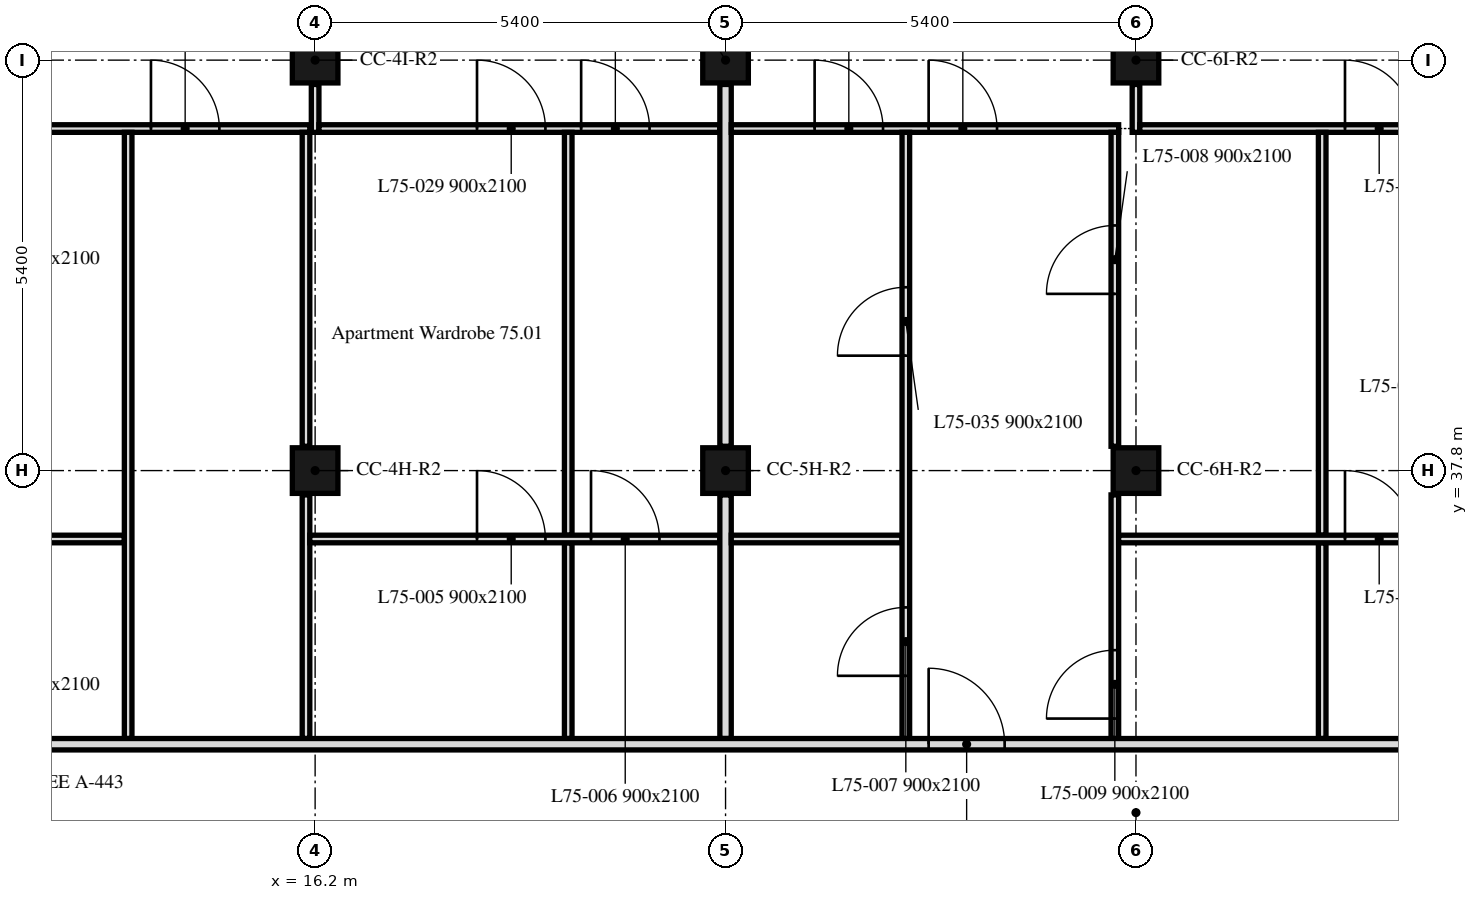
"""IFC4 building model, lengths in metres.
Left out: names, types, materials, properties, quantities, classifications, styles, units other than length and angle.
Written with IfcOpenShell. Run it as: python <this file> out.ifc"""

import sys

from ifc_helpers import new_model, si_unit, direction, frame, frame_2d, origin, origin_2d, place, context, subcontext, project, spatial, rectangle, extrude, element, fill, save


model = new_model("IFC4")
c1 = context("Model", 3, precision=1e-05, world=origin(), true_north=direction((0.0, 1.0)))
c2 = subcontext(c1, "Body", "Model", "MODEL_VIEW")
j1 = project(units=[si_unit("LENGTHUNIT", "METRE"), si_unit("PLANEANGLEUNIT", "RADIAN")], contexts=[c1])
p1 = place(None, origin())
s1 = spatial("IfcSite", under=j1, at=p1, CompositionType="ELEMENT")
p2 = place(p1, origin())
s2 = spatial("IfcBuilding", under=s1, at=p2, CompositionType="ELEMENT")
p3 = place(p2, frame((0.0, 0.0, 301.6)))
s3 = spatial("IfcBuildingStorey", under=s2, at=p3, CompositionType="ELEMENT", Elevation=301.6)
for number, where, z_axis, x_axis in (
    (1, (16.2, 37.8, 0.0), (0.0, 0.0, 1.0), (1.0, 0.0, 0.0)),
    (2, (21.6, 37.8, 0.0), (0.0, 0.0, 1.0), (1.0, 0.0, 0.0)),
    (3, (27.0, 37.8, 0.0), (0.0, 0.0, 1.0), (1.0, 0.0, 0.0)),
    (4, (16.2, 43.2, 0.0), (0.0, 0.0, 1.0), (1.0, 0.0, 0.0)),
    (5, (21.6, 43.2, 0.0), (0.0, 0.0, 1.0), (1.0, 0.0, 0.0)),
    (6, (27.0, 43.2, 0.0), (0.0, 0.0, 1.0), (1.0, 0.0, 0.0)),
):
    element("IfcColumn", number, at=place(p3, frame(where, z_axis=z_axis, x_axis=x_axis)), inside=s3, PredefinedType="COLUMN", context=c2, shape_type="SweptSolid", body=[
        extrude(rectangle(XDim=0.6, YDim=0.6, at=origin_2d()), origin(), (0.0, 0.0, 1.0), 3.0),
    ])
p4 = place(p3, frame((6.151, 42.3, 0.0), z_axis=(0.0, 0.0, 1.0), x_axis=(1.0, 0.0, 0.0)))
e7 = element("IfcWall", 7, at=p4, inside=s3, PredefinedType="PARTITIONING", context=c2, shape_type="SweptSolid", body=[
    extrude(rectangle(XDim=9.979, YDim=0.1, at=frame_2d((4.99, 0.0))), origin(), (0.0, 0.0, 1.0), 3.0),
])
p5 = place(p4, frame((7.889, 0.0, 0.0)))
e8 = element("IfcOpeningElement", 8, at=p5, cuts=e7, PredefinedType="OPENING", context=c2, shape_type="SweptSolid", body=[
    extrude(rectangle(XDim=0.9, YDim=2.1, at=frame_2d((0.45, 1.05))), frame((0.0, 0.05, 0.0), z_axis=(0.0, -1.0, 0.0), x_axis=(1.0, 0.0, 0.0)), (0.0, 0.0, 1.0), 0.1),
])
p6 = place(p4, frame((1.019, 0.0, 0.0)))
e9 = element("IfcOpeningElement", 9, at=p6, cuts=e7, PredefinedType="OPENING", context=c2, shape_type="SweptSolid", body=[
    extrude(rectangle(XDim=0.9, YDim=2.1, at=frame_2d((0.45, 1.05))), frame((0.0, 0.05, 0.0), z_axis=(0.0, -1.0, 0.0), x_axis=(1.0, 0.0, 0.0)), (0.0, 0.0, 1.0), 0.1),
])
p7 = place(p4, frame((2.389, 0.0, 0.0)))
e10 = element("IfcOpeningElement", 10, at=p7, cuts=e7, PredefinedType="OPENING", context=c2, shape_type="SweptSolid", body=[
    extrude(rectangle(XDim=0.9, YDim=2.1, at=frame_2d((0.45, 1.05))), frame((0.0, 0.05, 0.0), z_axis=(0.0, -1.0, 0.0), x_axis=(1.0, 0.0, 0.0)), (0.0, 0.0, 1.0), 0.1),
])
p8 = place(p3, frame((16.2, 42.25, 0.0), z_axis=(0.0, 0.0, 1.0), x_axis=(0.0, 1.0, 0.0)))
e11 = element("IfcWall", 11, at=p8, inside=s3, PredefinedType="PARTITIONING", context=c2, shape_type="SweptSolid", body=[
    extrude(rectangle(XDim=0.63, YDim=0.1, at=frame_2d((0.315, 0.0))), origin(), (0.0, 0.0, 1.0), 2.4),
])
p9 = place(p3, frame((16.25, 42.3, 0.0), z_axis=(0.0, 0.0, 1.0), x_axis=(1.0, 0.0, 0.0)))
e12 = element("IfcWall", 12, at=p9, inside=s3, PredefinedType="PARTITIONING", context=c2, shape_type="SweptSolid", body=[
    extrude(rectangle(XDim=5.275, YDim=0.1, at=frame_2d((2.637, 0.0))), origin(), (0.0, 0.0, 1.0), 3.0),
])
p10 = place(p9, frame((2.08, 0.0, 0.0)))
e13 = element("IfcOpeningElement", 13, at=p10, cuts=e12, PredefinedType="OPENING", context=c2, shape_type="SweptSolid", body=[
    extrude(rectangle(XDim=0.9, YDim=2.1, at=frame_2d((0.45, 1.05))), frame((0.0, 0.05, 0.0), z_axis=(0.0, -1.0, 0.0), x_axis=(1.0, 0.0, 0.0)), (0.0, 0.0, 1.0), 0.1),
])
p11 = place(p9, frame((3.45, 0.0, 0.0)))
e14 = element("IfcOpeningElement", 14, at=p11, cuts=e12, PredefinedType="OPENING", context=c2, shape_type="SweptSolid", body=[
    extrude(rectangle(XDim=0.9, YDim=2.1, at=frame_2d((0.45, 1.05))), frame((0.0, 0.05, 0.0), z_axis=(0.0, -1.0, 0.0), x_axis=(1.0, 0.0, 0.0)), (0.0, 0.0, 1.0), 0.1),
])
p12 = place(p3, frame((10.99, 36.9, 0.0), z_axis=(0.0, 0.0, 1.0), x_axis=(1.0, 0.0, 0.0)))
e15 = element("IfcWall", 15, at=p12, inside=s3, PredefinedType="PARTITIONING", context=c2, shape_type="SweptSolid", body=[
    extrude(rectangle(XDim=2.7, YDim=0.1, at=frame_2d((1.35, 0.0))), origin(), (0.0, 0.0, 1.0), 3.0),
])
p13 = place(p3, frame((13.74, 34.275, 0.0), z_axis=(0.0, 0.0, 1.0), x_axis=(0.0, 1.0, 0.0)))
e16 = element("IfcWall", 16, at=p13, inside=s3, PredefinedType="PARTITIONING", context=c2, shape_type="SweptSolid", body=[
    extrude(rectangle(XDim=7.975, YDim=0.1, at=frame_2d((3.988, 0.0))), origin(), (0.0, 0.0, 1.0), 3.0),
])
p14 = place(p3, frame((16.08, 34.275, 0.0), z_axis=(0.0, 0.0, 1.0), x_axis=(0.0, 1.0, 0.0)))
e17 = element("IfcWall", 17, at=p14, inside=s3, PredefinedType="PARTITIONING", context=c2, shape_type="SweptSolid", body=[
    extrude(rectangle(XDim=3.205, YDim=0.1, at=frame_2d((1.603, 0.0))), origin(), (0.0, 0.0, 1.0), 2.4),
])
p15 = place(p3, frame((16.08, 38.12, 0.0), z_axis=(0.0, 0.0, 1.0), x_axis=(0.0, 1.0, 0.0)))
e18 = element("IfcWall", 18, at=p15, inside=s3, PredefinedType="PARTITIONING", context=c2, shape_type="SweptSolid", body=[
    extrude(rectangle(XDim=4.13, YDim=0.1, at=frame_2d((2.065, 0.0))), origin(), (0.0, 0.0, 1.0), 2.4),
])
p16 = place(p3, frame((19.53, 36.95, 0.0), z_axis=(0.0, 0.0, 1.0), x_axis=(0.0, 1.0, 0.0)))
e19 = element("IfcWall", 19, at=p16, inside=s3, PredefinedType="PARTITIONING", context=c2, shape_type="SweptSolid", body=[
    extrude(rectangle(XDim=5.3, YDim=0.1, at=frame_2d((2.65, 0.0))), origin(), (0.0, 0.0, 1.0), 3.0),
])
p17 = place(p3, frame((19.53, 34.275, 0.0), z_axis=(0.0, 0.0, 1.0), x_axis=(0.0, 1.0, 0.0)))
e20 = element("IfcWall", 20, at=p17, inside=s3, PredefinedType="PARTITIONING", context=c2, shape_type="SweptSolid", body=[
    extrude(rectangle(XDim=2.575, YDim=0.1, at=frame_2d((1.288, 0.0))), origin(), (0.0, 0.0, 1.0), 3.0),
])
p18 = place(p3, frame((16.13, 36.9, 0.0), z_axis=(0.0, 0.0, 1.0), x_axis=(1.0, 0.0, 0.0)))
e21 = element("IfcWall", 21, at=p18, inside=s3, PredefinedType="PARTITIONING", context=c2, shape_type="SweptSolid", body=[
    extrude(rectangle(XDim=5.395, YDim=0.1, at=frame_2d((2.698, 0.0))), origin(), (0.0, 0.0, 1.0), 3.0),
])
p19 = place(p18, frame((2.2, 0.0, 0.0)))
e22 = element("IfcOpeningElement", 22, at=p19, cuts=e21, PredefinedType="OPENING", context=c2, shape_type="SweptSolid", body=[
    extrude(rectangle(XDim=0.9, YDim=2.1, at=frame_2d((0.45, 1.05))), frame((0.0, 0.05, 0.0), z_axis=(0.0, -1.0, 0.0), x_axis=(1.0, 0.0, 0.0)), (0.0, 0.0, 1.0), 0.1),
])
p20 = place(p18, frame((3.7, 0.0, 0.0)))
e23 = element("IfcOpeningElement", 23, at=p20, cuts=e21, PredefinedType="OPENING", context=c2, shape_type="SweptSolid", body=[
    extrude(rectangle(XDim=0.9, YDim=2.1, at=frame_2d((0.45, 1.05))), frame((0.0, 0.05, 0.0), z_axis=(0.0, -1.0, 0.0), x_axis=(1.0, 0.0, 0.0)), (0.0, 0.0, 1.0), 0.1),
])
p21 = place(p3, frame((21.6, 38.12, 0.0), z_axis=(0.0, 0.0, 1.0), x_axis=(0.0, 1.0, 0.0)))
e24 = element("IfcWall", 24, at=p21, inside=s3, PredefinedType="PARTITIONING", context=c2, shape_type="SweptSolid", body=[
    extrude(rectangle(XDim=4.76, YDim=0.15, at=frame_2d((2.38, 0.0))), origin(), (0.0, 0.0, 1.0), 2.4),
])
p22 = place(p3, frame((21.6, 34.275, 0.0), z_axis=(0.0, 0.0, 1.0), x_axis=(0.0, 1.0, 0.0)))
e25 = element("IfcWall", 25, at=p22, inside=s3, PredefinedType="PARTITIONING", context=c2, shape_type="SweptSolid", body=[
    extrude(rectangle(XDim=3.205, YDim=0.15, at=frame_2d((1.603, 0.0))), origin(), (0.0, 0.0, 1.0), 2.4),
])
p23 = place(p3, frame((21.675, 42.3, 0.0), z_axis=(0.0, 0.0, 1.0), x_axis=(1.0, 0.0, 0.0)))
e26 = element("IfcWall", 26, at=p23, inside=s3, PredefinedType="PARTITIONING", context=c2, shape_type="SweptSolid", body=[
    extrude(rectangle(XDim=5.097, YDim=0.1, at=frame_2d((2.548, 0.0))), origin(), (0.0, 0.0, 1.0), 3.0),
])
p24 = place(p23, frame((1.097, 0.0, 0.0)))
e27 = element("IfcOpeningElement", 27, at=p24, cuts=e26, PredefinedType="OPENING", context=c2, shape_type="SweptSolid", body=[
    extrude(rectangle(XDim=0.9, YDim=2.1, at=frame_2d((0.45, 1.05))), frame((0.0, 0.05, 0.0), z_axis=(0.0, -1.0, 0.0), x_axis=(1.0, 0.0, 0.0)), (0.0, 0.0, 1.0), 0.1),
])
p25 = place(p23, frame((2.597, 0.0, 0.0)))
e28 = element("IfcOpeningElement", 28, at=p25, cuts=e26, PredefinedType="OPENING", context=c2, shape_type="SweptSolid", body=[
    extrude(rectangle(XDim=0.9, YDim=2.1, at=frame_2d((0.45, 1.05))), frame((0.0, 0.05, 0.0), z_axis=(0.0, -1.0, 0.0), x_axis=(1.0, 0.0, 0.0)), (0.0, 0.0, 1.0), 0.1),
])
p26 = place(p3, frame((27.0, 42.25, 0.0), z_axis=(0.0, 0.0, 1.0), x_axis=(0.0, 1.0, 0.0)))
e29 = element("IfcWall", 29, at=p26, inside=s3, PredefinedType="PARTITIONING", context=c2, shape_type="SweptSolid", body=[
    extrude(rectangle(XDim=0.63, YDim=0.1, at=frame_2d((0.315, 0.0))), origin(), (0.0, 0.0, 1.0), 2.4),
])
p27 = place(p3, frame((27.05, 42.3, 0.0), z_axis=(0.0, 0.0, 1.0), x_axis=(1.0, 0.0, 0.0)))
e30 = element("IfcWall", 30, at=p27, inside=s3, PredefinedType="PARTITIONING", context=c2, shape_type="SweptSolid", body=[
    extrude(rectangle(XDim=5.275, YDim=0.1, at=frame_2d((2.637, 0.0))), origin(), (0.0, 0.0, 1.0), 3.0),
])
p28 = place(p27, frame((2.7, 0.0, 0.0)))
e31 = element("IfcOpeningElement", 31, at=p28, cuts=e30, PredefinedType="OPENING", context=c2, shape_type="SweptSolid", body=[
    extrude(rectangle(XDim=0.9, YDim=2.1, at=frame_2d((0.45, 1.05))), frame((0.0, 0.05, 0.0), z_axis=(0.0, -1.0, 0.0), x_axis=(1.0, 0.0, 0.0)), (0.0, 0.0, 1.0), 0.1),
])
p29 = place(p3, frame((21.675, 36.9, 0.0), z_axis=(0.0, 0.0, 1.0), x_axis=(1.0, 0.0, 0.0)))
e32 = element("IfcWall", 32, at=p29, inside=s3, PredefinedType="PARTITIONING", context=c2, shape_type="SweptSolid", body=[
    extrude(rectangle(XDim=2.247, YDim=0.1, at=frame_2d((1.124, 0.0))), origin(), (0.0, 0.0, 1.0), 3.0),
])
p30 = place(p3, frame((23.972, 34.275, 0.0), z_axis=(0.0, 0.0, 1.0), x_axis=(0.0, 1.0, 0.0)))
e33 = element("IfcWall", 33, at=p30, inside=s3, PredefinedType="PARTITIONING", context=c2, shape_type="SweptSolid", body=[
    extrude(rectangle(XDim=7.975, YDim=0.1, at=frame_2d((3.988, 0.0))), origin(), (0.0, 0.0, 1.0), 3.0),
])
p31 = place(p30, frame((0.825, 0.0, 0.0)))
e34 = element("IfcOpeningElement", 34, at=p31, cuts=e33, PredefinedType="OPENING", context=c2, shape_type="SweptSolid", body=[
    extrude(rectangle(XDim=0.9, YDim=2.1, at=frame_2d((0.45, 1.05))), frame((0.0, 0.05, 0.0), z_axis=(0.0, -1.0, 0.0), x_axis=(1.0, 0.0, 0.0)), (0.0, 0.0, 1.0), 0.1),
])
p32 = place(p30, frame((5.037, 0.0, 0.0)))
e35 = element("IfcOpeningElement", 35, at=p32, cuts=e33, PredefinedType="OPENING", context=c2, shape_type="SweptSolid", body=[
    extrude(rectangle(XDim=0.9, YDim=2.1, at=frame_2d((0.45, 1.05))), frame((0.0, 0.05, 0.0), z_axis=(0.0, -1.0, 0.0), x_axis=(1.0, 0.0, 0.0)), (0.0, 0.0, 1.0), 0.1),
])
p33 = place(p3, frame((26.722, 34.275, 0.0), z_axis=(0.0, 0.0, 1.0), x_axis=(0.0, 1.0, 0.0)))
e36 = element("IfcWall", 36, at=p33, inside=s3, PredefinedType="PARTITIONING", context=c2, shape_type="SweptSolid", body=[
    extrude(rectangle(XDim=3.205, YDim=0.1, at=frame_2d((1.603, 0.0))), origin(), (0.0, 0.0, 1.0), 3.0),
])
p34 = place(p33, frame((0.262, 0.0, 0.0)))
e37 = element("IfcOpeningElement", 37, at=p34, cuts=e36, PredefinedType="OPENING", context=c2, shape_type="SweptSolid", body=[
    extrude(rectangle(XDim=0.9, YDim=2.1, at=frame_2d((0.45, 1.05))), frame((0.0, 0.05, 0.0), z_axis=(0.0, -1.0, 0.0), x_axis=(1.0, 0.0, 0.0)), (0.0, 0.0, 1.0), 0.1),
])
p35 = place(p3, frame((26.722, 38.12, 0.0), z_axis=(0.0, 0.0, 1.0), x_axis=(0.0, 1.0, 0.0)))
e38 = element("IfcWall", 38, at=p35, inside=s3, PredefinedType="PARTITIONING", context=c2, shape_type="SweptSolid", body=[
    extrude(rectangle(XDim=4.13, YDim=0.1, at=frame_2d((2.065, 0.0))), origin(), (0.0, 0.0, 1.0), 3.0),
])
p36 = place(p35, frame((2.005, 0.0, 0.0)))
e39 = element("IfcOpeningElement", 39, at=p36, cuts=e38, PredefinedType="OPENING", context=c2, shape_type="SweptSolid", body=[
    extrude(rectangle(XDim=0.9, YDim=2.1, at=frame_2d((0.45, 1.05))), frame((0.0, 0.05, 0.0), z_axis=(0.0, -1.0, 0.0), x_axis=(1.0, 0.0, 0.0)), (0.0, 0.0, 1.0), 0.1),
])
p37 = place(p3, frame((29.45, 36.95, 0.0), z_axis=(0.0, 0.0, 1.0), x_axis=(0.0, 1.0, 0.0)))
e40 = element("IfcWall", 40, at=p37, inside=s3, PredefinedType="PARTITIONING", context=c2, shape_type="SweptSolid", body=[
    extrude(rectangle(XDim=5.3, YDim=0.1, at=frame_2d((2.65, 0.0))), origin(), (0.0, 0.0, 1.0), 3.0),
])
p38 = place(p3, frame((29.45, 34.275, 0.0), z_axis=(0.0, 0.0, 1.0), x_axis=(0.0, 1.0, 0.0)))
e41 = element("IfcWall", 41, at=p38, inside=s3, PredefinedType="PARTITIONING", context=c2, shape_type="SweptSolid", body=[
    extrude(rectangle(XDim=2.575, YDim=0.1, at=frame_2d((1.288, 0.0))), origin(), (0.0, 0.0, 1.0), 3.0),
])
p39 = place(p3, frame((26.772, 36.9, 0.0), z_axis=(0.0, 0.0, 1.0), x_axis=(1.0, 0.0, 0.0)))
e42 = element("IfcWall", 42, at=p39, inside=s3, PredefinedType="PARTITIONING", context=c2, shape_type="SweptSolid", body=[
    extrude(rectangle(XDim=5.553, YDim=0.1, at=frame_2d((2.776, 0.0))), origin(), (0.0, 0.0, 1.0), 2.4),
])
p40 = place(p39, frame((2.978, 0.0, 0.0)))
e43 = element("IfcOpeningElement", 43, at=p40, cuts=e42, PredefinedType="OPENING", context=c2, shape_type="SweptSolid", body=[
    extrude(rectangle(XDim=0.9, YDim=2.1, at=frame_2d((0.45, 1.05))), frame((0.0, 0.05, 0.0), z_axis=(0.0, -1.0, 0.0), x_axis=(1.0, 0.0, 0.0)), (0.0, 0.0, 1.0), 0.1),
])
p41 = place(p3, frame((6.151, 34.2, 0.0), z_axis=(0.0, 0.0, 1.0), x_axis=(1.0, 0.0, 0.0)))
e44 = element("IfcWall", 44, at=p41, inside=s3, PredefinedType="PARTITIONING", context=c2, shape_type="SweptSolid", body=[
    extrude(rectangle(XDim=41.698, YDim=0.15, at=frame_2d((20.849, 0.0))), origin(), (0.0, 0.0, 1.0), 2.4),
])
p42 = place(p41, frame((2.939, 0.0, 0.0)))
e45 = element("IfcOpeningElement", 45, at=p42, cuts=e44, PredefinedType="OPENING", context=c2, shape_type="SweptSolid", body=[
    extrude(rectangle(XDim=1.0, YDim=2.1, at=frame_2d((0.5, 1.05))), frame((0.0, 0.075, 0.0), z_axis=(0.0, -1.0, 0.0), x_axis=(1.0, 0.0, 0.0)), (0.0, 0.0, 1.0), 0.15),
])
p43 = place(p41, frame((18.121, 0.0, 0.0)))
e46 = element("IfcOpeningElement", 46, at=p43, cuts=e44, PredefinedType="OPENING", context=c2, shape_type="SweptSolid", body=[
    extrude(rectangle(XDim=1.0, YDim=2.1, at=frame_2d((0.5, 1.05))), frame((0.0, 0.075, 0.0), z_axis=(0.0, -1.0, 0.0), x_axis=(1.0, 0.0, 0.0)), (0.0, 0.0, 1.0), 0.15),
])
p44 = place(p41, frame((32.359, 0.0, 0.0)))
e47 = element("IfcOpeningElement", 47, at=p44, cuts=e44, PredefinedType="OPENING", context=c2, shape_type="SweptSolid", body=[
    extrude(rectangle(XDim=1.0, YDim=2.1, at=frame_2d((0.5, 1.05))), frame((0.0, 0.075, 0.0), z_axis=(0.0, -1.0, 0.0), x_axis=(1.0, 0.0, 0.0)), (0.0, 0.0, 1.0), 0.15),
])
p45 = place(p5, origin())
e48 = element("IfcDoor", 48, at=p45, inside=s3, OperationType="SINGLE_SWING_RIGHT", PredefinedType="DOOR", context=c2, shape_type="SweptSolid", body=[
    extrude(rectangle(XDim=0.9, YDim=2.1, at=frame_2d((0.45, 1.05))), frame((0.0, 0.025, 0.0), z_axis=(0.0, -1.0, 0.0), x_axis=(1.0, 0.0, 0.0)), (0.0, 0.0, 1.0), 0.05),
])
fill(e8, e48)
p46 = place(p19, origin())
e49 = element("IfcDoor", 49, at=p46, inside=s3, OperationType="SINGLE_SWING_LEFT", PredefinedType="DOOR", context=c2, shape_type="SweptSolid", body=[
    extrude(rectangle(XDim=0.9, YDim=2.1, at=frame_2d((0.45, 1.05))), frame((0.0, 0.025, 0.0), z_axis=(0.0, -1.0, 0.0), x_axis=(1.0, 0.0, 0.0)), (0.0, 0.0, 1.0), 0.05),
])
fill(e22, e49)
p47 = place(p20, origin())
e50 = element("IfcDoor", 50, at=p47, inside=s3, OperationType="SINGLE_SWING_LEFT", PredefinedType="DOOR", context=c2, shape_type="SweptSolid", body=[
    extrude(rectangle(XDim=0.9, YDim=2.1, at=frame_2d((0.45, 1.05))), frame((0.0, 0.025, 0.0), z_axis=(0.0, -1.0, 0.0), x_axis=(1.0, 0.0, 0.0)), (0.0, 0.0, 1.0), 0.05),
])
fill(e23, e50)
p48 = place(p31, origin())
e51 = element("IfcDoor", 51, at=p48, inside=s3, OperationType="SINGLE_SWING_RIGHT", PredefinedType="DOOR", context=c2, shape_type="SweptSolid", body=[
    extrude(rectangle(XDim=0.9, YDim=2.1, at=frame_2d((0.45, 1.05))), frame((0.0, 0.025, 0.0), z_axis=(0.0, -1.0, 0.0), x_axis=(1.0, 0.0, 0.0)), (0.0, 0.0, 1.0), 0.05),
])
fill(e34, e51)
p49 = place(p36, origin())
e52 = element("IfcDoor", 52, at=p49, inside=s3, OperationType="SINGLE_SWING_LEFT", PredefinedType="DOOR", context=c2, shape_type="SweptSolid", body=[
    extrude(rectangle(XDim=0.9, YDim=2.1, at=frame_2d((0.45, 1.05))), frame((0.0, 0.025, 0.0), z_axis=(0.0, -1.0, 0.0), x_axis=(1.0, 0.0, 0.0)), (0.0, 0.0, 1.0), 0.05),
])
fill(e39, e52)
p50 = place(p34, origin())
e53 = element("IfcDoor", 53, at=p50, inside=s3, OperationType="SINGLE_SWING_LEFT", PredefinedType="DOOR", context=c2, shape_type="SweptSolid", body=[
    extrude(rectangle(XDim=0.9, YDim=2.1, at=frame_2d((0.45, 1.05))), frame((0.0, 0.025, 0.0), z_axis=(0.0, -1.0, 0.0), x_axis=(1.0, 0.0, 0.0)), (0.0, 0.0, 1.0), 0.05),
])
fill(e37, e53)
p51 = place(p40, origin())
e54 = element("IfcDoor", 54, at=p51, inside=s3, OperationType="SINGLE_SWING_LEFT", PredefinedType="DOOR", context=c2, shape_type="SweptSolid", body=[
    extrude(rectangle(XDim=0.9, YDim=2.1, at=frame_2d((0.45, 1.05))), frame((0.0, 0.025, 0.0), z_axis=(0.0, -1.0, 0.0), x_axis=(1.0, 0.0, 0.0)), (0.0, 0.0, 1.0), 0.05),
])
fill(e43, e54)
p52 = place(p10, origin())
e55 = element("IfcDoor", 55, at=p52, inside=s3, OperationType="SINGLE_SWING_LEFT", PredefinedType="DOOR", context=c2, shape_type="SweptSolid", body=[
    extrude(rectangle(XDim=0.9, YDim=2.1, at=frame_2d((0.45, 1.05))), frame((0.0, 0.025, 0.0), z_axis=(0.0, -1.0, 0.0), x_axis=(1.0, 0.0, 0.0)), (0.0, 0.0, 1.0), 0.05),
])
fill(e13, e55)
p53 = place(p11, origin())
e56 = element("IfcDoor", 56, at=p53, inside=s3, OperationType="SINGLE_SWING_RIGHT", PredefinedType="DOOR", context=c2, shape_type="SweptSolid", body=[
    extrude(rectangle(XDim=0.9, YDim=2.1, at=frame_2d((0.45, 1.05))), frame((0.0, 0.025, 0.0), z_axis=(0.0, -1.0, 0.0), x_axis=(1.0, 0.0, 0.0)), (0.0, 0.0, 1.0), 0.05),
])
fill(e14, e56)
p54 = place(p24, origin())
e57 = element("IfcDoor", 57, at=p54, inside=s3, OperationType="SINGLE_SWING_LEFT", PredefinedType="DOOR", context=c2, shape_type="SweptSolid", body=[
    extrude(rectangle(XDim=0.9, YDim=2.1, at=frame_2d((0.45, 1.05))), frame((0.0, 0.025, 0.0), z_axis=(0.0, -1.0, 0.0), x_axis=(1.0, 0.0, 0.0)), (0.0, 0.0, 1.0), 0.05),
])
fill(e27, e57)
p55 = place(p28, origin())
e58 = element("IfcDoor", 58, at=p55, inside=s3, OperationType="SINGLE_SWING_RIGHT", PredefinedType="DOOR", context=c2, shape_type="SweptSolid", body=[
    extrude(rectangle(XDim=0.9, YDim=2.1, at=frame_2d((0.45, 1.05))), frame((0.0, 0.025, 0.0), z_axis=(0.0, -1.0, 0.0), x_axis=(1.0, 0.0, 0.0)), (0.0, 0.0, 1.0), 0.05),
])
fill(e31, e58)
p56 = place(p32, origin())
e59 = element("IfcDoor", 59, at=p56, inside=s3, OperationType="SINGLE_SWING_LEFT", PredefinedType="DOOR", context=c2, shape_type="SweptSolid", body=[
    extrude(rectangle(XDim=0.9, YDim=2.1, at=frame_2d((0.45, 1.05))), frame((0.0, 0.025, 0.0), z_axis=(0.0, -1.0, 0.0), x_axis=(1.0, 0.0, 0.0)), (0.0, 0.0, 1.0), 0.05),
])
fill(e35, e59)
p57 = place(p25, origin())
e60 = element("IfcDoor", 60, at=p57, inside=s3, OperationType="SINGLE_SWING_RIGHT", PredefinedType="DOOR", context=c2, shape_type="SweptSolid", body=[
    extrude(rectangle(XDim=0.9, YDim=2.1, at=frame_2d((0.45, 1.05))), frame((0.0, 0.025, 0.0), z_axis=(0.0, -1.0, 0.0), x_axis=(1.0, 0.0, 0.0)), (0.0, 0.0, 1.0), 0.05),
])
fill(e28, e60)
p58 = place(p43, origin())
e61 = element("IfcDoor", 61, at=p58, inside=s3, OperationType="SINGLE_SWING_LEFT", PredefinedType="DOOR", context=c2, shape_type="SweptSolid", body=[
    extrude(rectangle(XDim=1.0, YDim=2.1, at=frame_2d((0.5, 1.05))), frame((0.0, 0.025, 0.0), z_axis=(0.0, -1.0, 0.0), x_axis=(1.0, 0.0, 0.0)), (0.0, 0.0, 1.0), 0.05),
])
fill(e46, e61)
save(model, sys.argv[1])
